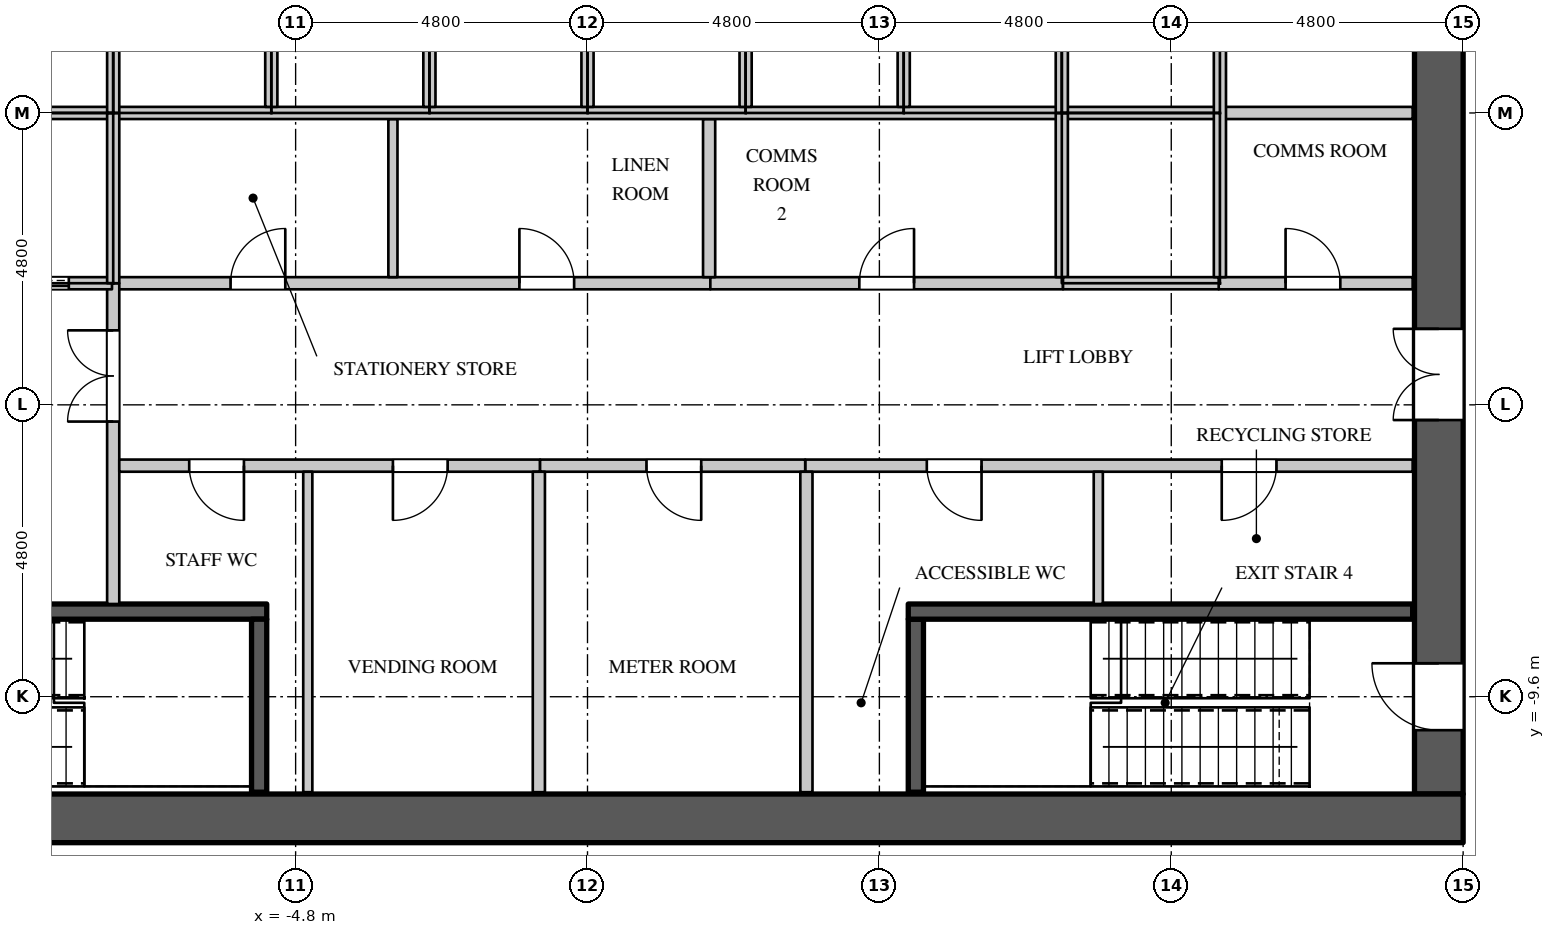
"""IFC4 building model, lengths in metres.
Left out: names, types, materials, properties, quantities, classifications, styles, units other than length and angle.
Written with IfcOpenShell. Run it as: python <this file> out.ifc"""

import sys

from ifc_helpers import new_model, si_unit, direction, frame, frame_2d, origin, place, context, subcontext, project, spatial, rectangle, extrude, element, fill, save


model = new_model("IFC4")
c1 = context("Model", 3, precision=1e-05, world=origin(), true_north=direction((0.0, 1.0)))
c2 = subcontext(c1, "Body", "Model", "MODEL_VIEW")
j1 = project(units=[si_unit("LENGTHUNIT", "METRE"), si_unit("PLANEANGLEUNIT", "RADIAN")], contexts=[c1])
p1 = place(None, origin())
s1 = spatial("IfcSite", under=j1, at=p1, CompositionType="ELEMENT")
p2 = place(p1, origin())
s2 = spatial("IfcBuilding", under=s1, at=p2, CompositionType="ELEMENT")
p3 = place(p2, frame((0.0, 0.0, 131.7)))
s3 = spatial("IfcBuildingStorey", under=s2, at=p3, CompositionType="ELEMENT", Elevation=131.7)
p4 = place(p3, frame((-14.4, -11.6, 0.0), z_axis=(0.0, 0.0, 1.0), x_axis=(1.0, 0.0, 0.0)))
e1 = element("IfcWall", 1, at=p4, inside=s3, PredefinedType="SHEAR", context=c2, shape_type="SweptSolid", body=[
    extrude(rectangle(XDim=28.8, YDim=0.8, at=frame_2d((14.4, 0.0))), origin(), (0.0, 0.0, 1.0), 4.2),
])
p5 = place(p3, frame((14.0, -11.2, 0.0), z_axis=(0.0, 0.0, 1.0), x_axis=(0.0, 1.0, 0.0)))
e2 = element("IfcWall", 2, at=p5, inside=s3, PredefinedType="SHEAR", context=c2, shape_type="SweptSolid", body=[
    extrude(rectangle(XDim=22.4, YDim=0.8, at=frame_2d((11.2, 0.0))), origin(), (0.0, 0.0, 1.0), 4.2),
])
p6 = place(p5, frame((20.25, 0.0, 0.0)))
e3 = element("IfcOpeningElement", 3, at=p6, cuts=e2, PredefinedType="OPENING", context=c2, shape_type="SweptSolid", body=[
    extrude(rectangle(XDim=1.1, YDim=2.2, at=frame_2d((0.55, 1.1))), frame((0.0, 0.41, 0.0), z_axis=(0.0, -1.0, 0.0), x_axis=(1.0, 0.0, 0.0)), (0.0, 0.0, 1.0), 0.82),
])
p7 = place(p5, frame((1.05, 0.0, 0.0)))
e4 = element("IfcOpeningElement", 4, at=p7, cuts=e2, PredefinedType="OPENING", context=c2, shape_type="SweptSolid", body=[
    extrude(rectangle(XDim=1.1, YDim=2.2, at=frame_2d((0.55, 1.1))), frame((0.0, 0.41, 0.0), z_axis=(0.0, -1.0, 0.0), x_axis=(1.0, 0.0, 0.0)), (0.0, 0.0, 1.0), 0.82),
])
p8 = place(p5, frame((14.75, 0.0, 0.0)))
e5 = element("IfcOpeningElement", 5, at=p8, cuts=e2, PredefinedType="OPENING", context=c2, shape_type="SweptSolid", body=[
    extrude(rectangle(XDim=1.5, YDim=2.4, at=frame_2d((0.75, 1.2))), frame((0.0, 0.41, 0.0), z_axis=(0.0, -1.0, 0.0), x_axis=(1.0, 0.0, 0.0)), (0.0, 0.0, 1.0), 0.82),
])
p9 = place(p5, frame((6.15, 0.0, 0.0)))
e6 = element("IfcOpeningElement", 6, at=p9, cuts=e2, PredefinedType="OPENING", context=c2, shape_type="SweptSolid", body=[
    extrude(rectangle(XDim=1.5, YDim=2.4, at=frame_2d((0.75, 1.2))), frame((0.0, 0.41, 0.0), z_axis=(0.0, -1.0, 0.0), x_axis=(1.0, 0.0, 0.0)), (0.0, 0.0, 1.0), 0.82),
])
p10 = place(p3, frame((-7.82, -2.8, 0.0), z_axis=(0.0, 0.0, 1.0), x_axis=(1.0, 0.0, 0.0)))
e7 = element("IfcWall", 7, at=p10, inside=s3, PredefinedType="PARTITIONING", context=c2, shape_type="SweptSolid", body=[
    extrude(rectangle(XDim=9.84, YDim=0.2, at=frame_2d((4.92, 0.0))), origin(), (0.0, 0.0, 1.0), 3.95),
])
p11 = place(p10, frame((1.95, 0.0, 0.0)))
e8 = element("IfcOpeningElement", 8, at=p11, cuts=e7, PredefinedType="OPENING", context=c2, shape_type="SweptSolid", body=[
    extrude(rectangle(XDim=0.9, YDim=2.2, at=frame_2d((0.45, 1.1))), frame((0.0, 0.11, 0.0), z_axis=(0.0, -1.0, 0.0), x_axis=(1.0, 0.0, 0.0)), (0.0, 0.0, 1.0), 0.22),
])
p12 = place(p10, frame((6.7, 0.0, 0.0)))
e9 = element("IfcOpeningElement", 9, at=p12, cuts=e7, PredefinedType="OPENING", context=c2, shape_type="SweptSolid", body=[
    extrude(rectangle(XDim=0.9, YDim=2.2, at=frame_2d((0.45, 1.1))), frame((0.0, 0.11, 0.0), z_axis=(0.0, -1.0, 0.0), x_axis=(1.0, 0.0, 0.0)), (0.0, 0.0, 1.0), 0.22),
])
p13 = place(p3, frame((-7.8, -8.075, 0.0), z_axis=(0.0, 0.0, 1.0), x_axis=(0.0, 1.0, 0.0)))
e10 = element("IfcWall", 10, at=p13, inside=s3, PredefinedType="PARTITIONING", context=c2, shape_type="SweptSolid", body=[
    extrude(rectangle(XDim=5.275, YDim=0.2, at=frame_2d((2.637, 0.0))), origin(), (0.0, 0.0, 1.0), 3.95),
])
p14 = place(p13, frame((3.0, 0.0, 0.0)))
e11 = element("IfcOpeningElement", 11, at=p14, cuts=e10, PredefinedType="OPENING", context=c2, shape_type="SweptSolid", body=[
    extrude(rectangle(XDim=1.5, YDim=2.4, at=frame_2d((0.75, 1.2))), frame((0.0, 0.11, 0.0), z_axis=(0.0, -1.0, 0.0), x_axis=(1.0, 0.0, 0.0)), (0.0, 0.0, 1.0), 0.22),
])
p15 = place(p3, frame((-7.7, -5.8, 0.0), z_axis=(0.0, 0.0, 1.0), x_axis=(1.0, 0.0, 0.0)))
e12 = element("IfcWall", 12, at=p15, inside=s3, PredefinedType="PARTITIONING", context=c2, shape_type="SweptSolid", body=[
    extrude(rectangle(XDim=6.92, YDim=0.2, at=frame_2d((3.46, 0.0))), origin(), (0.0, 0.0, 1.0), 3.95),
])
p16 = place(p15, frame((1.15, 0.0, 0.0)))
e13 = element("IfcOpeningElement", 13, at=p16, cuts=e12, PredefinedType="OPENING", context=c2, shape_type="SweptSolid", body=[
    extrude(rectangle(XDim=0.9, YDim=2.2, at=frame_2d((0.45, 1.1))), frame((0.0, 0.11, 0.0), z_axis=(0.0, -1.0, 0.0), x_axis=(1.0, 0.0, 0.0)), (0.0, 0.0, 1.0), 0.22),
])
p17 = place(p15, frame((4.5, 0.0, 0.0)))
e14 = element("IfcOpeningElement", 14, at=p17, cuts=e12, PredefinedType="OPENING", context=c2, shape_type="SweptSolid", body=[
    extrude(rectangle(XDim=0.9, YDim=2.2, at=frame_2d((0.45, 1.1))), frame((0.0, 0.11, 0.0), z_axis=(0.0, -1.0, 0.0), x_axis=(1.0, 0.0, 0.0)), (0.0, 0.0, 1.0), 0.22),
])
p18 = place(p3, frame((3.58, -5.8, 0.0), z_axis=(0.0, 0.0, 1.0), x_axis=(1.0, 0.0, 0.0)))
e15 = element("IfcWall", 15, at=p18, inside=s3, PredefinedType="PARTITIONING", context=c2, shape_type="SweptSolid", body=[
    extrude(rectangle(XDim=9.99, YDim=0.2, at=frame_2d((4.995, 0.0))), origin(), (0.0, 0.0, 1.0), 3.95),
])
p19 = place(p18, frame((2.0, 0.0, 0.0)))
e16 = element("IfcOpeningElement", 16, at=p19, cuts=e15, PredefinedType="OPENING", context=c2, shape_type="SweptSolid", body=[
    extrude(rectangle(XDim=0.9, YDim=2.2, at=frame_2d((0.45, 1.1))), frame((0.0, 0.11, 0.0), z_axis=(0.0, -1.0, 0.0), x_axis=(1.0, 0.0, 0.0)), (0.0, 0.0, 1.0), 0.22),
])
p20 = place(p18, frame((6.85, 0.0, 0.0)))
e17 = element("IfcOpeningElement", 17, at=p20, cuts=e15, PredefinedType="OPENING", context=c2, shape_type="SweptSolid", body=[
    extrude(rectangle(XDim=0.9, YDim=2.2, at=frame_2d((0.45, 1.1))), frame((0.0, 0.11, 0.0), z_axis=(0.0, -1.0, 0.0), x_axis=(1.0, 0.0, 0.0)), (0.0, 0.0, 1.0), 0.22),
])
p21 = place(p3, frame((-4.6, -11.17, 0.0), z_axis=(0.0, 0.0, 1.0), x_axis=(0.0, 1.0, 0.0)))
e18 = element("IfcWall", 18, at=p21, inside=s3, PredefinedType="PARTITIONING", context=c2, shape_type="SweptSolid", body=[
    extrude(rectangle(XDim=5.27, YDim=0.15, at=frame_2d((2.635, 0.0))), origin(), (0.0, 0.0, 1.0), 3.95),
])
p22 = place(p3, frame((-3.2, -2.7, 0.0), z_axis=(0.0, 0.0, 1.0), x_axis=(0.0, 1.0, 0.0)))
e19 = element("IfcWall", 19, at=p22, inside=s3, PredefinedType="PARTITIONING", context=c2, shape_type="SweptSolid", body=[
    extrude(rectangle(XDim=2.6, YDim=0.15, at=frame_2d((1.3, 0.0))), origin(), (0.0, 0.0, 1.0), 3.95),
])
p23 = place(p3, frame((8.4, -8.075, 0.0), z_axis=(0.0, 0.0, 1.0), x_axis=(0.0, 1.0, 0.0)))
e20 = element("IfcWall", 20, at=p23, inside=s3, PredefinedType="PARTITIONING", context=c2, shape_type="SweptSolid", body=[
    extrude(rectangle(XDim=2.175, YDim=0.15, at=frame_2d((1.087, 0.0))), origin(), (0.0, 0.0, 1.0), 3.95),
])
p24 = place(p3, frame((-0.78, -5.8, 0.0), z_axis=(0.0, 0.0, 1.0), x_axis=(1.0, 0.0, 0.0)))
e21 = element("IfcWall", 21, at=p24, inside=s3, PredefinedType="PARTITIONING", context=c2, shape_type="SweptSolid", body=[
    extrude(rectangle(XDim=4.36, YDim=0.2, at=frame_2d((2.18, 0.0))), origin(), (0.0, 0.0, 1.0), 3.95),
])
p25 = place(p24, frame((1.75, 0.0, 0.0)))
e22 = element("IfcOpeningElement", 22, at=p25, cuts=e21, PredefinedType="OPENING", context=c2, shape_type="SweptSolid", body=[
    extrude(rectangle(XDim=0.9, YDim=2.2, at=frame_2d((0.45, 1.1))), frame((0.0, 0.11, 0.0), z_axis=(0.0, -1.0, 0.0), x_axis=(1.0, 0.0, 0.0)), (0.0, 0.0, 1.0), 0.22),
])
p26 = place(p3, frame((-0.8, -11.17, 0.0), z_axis=(0.0, 0.0, 1.0), x_axis=(0.0, 1.0, 0.0)))
e23 = element("IfcWall", 23, at=p26, inside=s3, PredefinedType="PARTITIONING", context=c2, shape_type="SweptSolid", body=[
    extrude(rectangle(XDim=5.27, YDim=0.2, at=frame_2d((2.635, 0.0))), origin(), (0.0, 0.0, 1.0), 3.95),
])
p27 = place(p3, frame((2.02, -2.8, 0.0), z_axis=(0.0, 0.0, 1.0), x_axis=(1.0, 0.0, 0.0)))
e24 = element("IfcWall", 24, at=p27, inside=s3, PredefinedType="PARTITIONING", context=c2, shape_type="SweptSolid", body=[
    extrude(rectangle(XDim=5.8, YDim=0.2, at=frame_2d((2.9, 0.0))), origin(), (0.0, 0.0, 1.0), 3.95),
])
p28 = place(p27, frame((2.45, 0.0, 0.0)))
e25 = element("IfcOpeningElement", 25, at=p28, cuts=e24, PredefinedType="OPENING", context=c2, shape_type="SweptSolid", body=[
    extrude(rectangle(XDim=0.9, YDim=2.2, at=frame_2d((0.45, 1.1))), frame((0.0, 0.11, 0.0), z_axis=(0.0, -1.0, 0.0), x_axis=(1.0, 0.0, 0.0)), (0.0, 0.0, 1.0), 0.22),
])
p29 = place(p3, frame((2.0, -2.7, 0.0), z_axis=(0.0, 0.0, 1.0), x_axis=(0.0, 1.0, 0.0)))
e26 = element("IfcWall", 26, at=p29, inside=s3, PredefinedType="PARTITIONING", context=c2, shape_type="SweptSolid", body=[
    extrude(rectangle(XDim=2.6, YDim=0.2, at=frame_2d((1.3, 0.0))), origin(), (0.0, 0.0, 1.0), 3.95),
])
p30 = place(p3, frame((3.6, -11.17, 0.0), z_axis=(0.0, 0.0, 1.0), x_axis=(0.0, 1.0, 0.0)))
e27 = element("IfcWall", 27, at=p30, inside=s3, PredefinedType="PARTITIONING", context=c2, shape_type="SweptSolid", body=[
    extrude(rectangle(XDim=5.27, YDim=0.2, at=frame_2d((2.635, 0.0))), origin(), (0.0, 0.0, 1.0), 3.95),
])
p31 = place(p3, frame((10.38, -2.8, 0.0), z_axis=(0.0, 0.0, 1.0), x_axis=(1.0, 0.0, 0.0)))
e28 = element("IfcWall", 28, at=p31, inside=s3, PredefinedType="PARTITIONING", context=c2, shape_type="SweptSolid", body=[
    extrude(rectangle(XDim=3.19, YDim=0.2, at=frame_2d((1.595, 0.0))), origin(), (0.0, 0.0, 1.0), 3.95),
])
p32 = place(p31, frame((1.1, 0.0, 0.0)))
e29 = element("IfcOpeningElement", 29, at=p32, cuts=e28, PredefinedType="OPENING", context=c2, shape_type="SweptSolid", body=[
    extrude(rectangle(XDim=0.9, YDim=2.2, at=frame_2d((0.45, 1.1))), frame((0.0, 0.11, 0.0), z_axis=(0.0, -1.0, 0.0), x_axis=(1.0, 0.0, 0.0)), (0.0, 0.0, 1.0), 0.22),
])
p33 = place(p3, frame((10.4, 0.0, 0.0), z_axis=(0.0, 0.0, 1.0), x_axis=(1.0, 0.0, 0.0)))
e30 = element("IfcWall", 30, at=p33, inside=s3, PredefinedType="PARTITIONING", context=c2, shape_type="SweptSolid", body=[
    extrude(rectangle(XDim=3.17, YDim=0.2, at=frame_2d((1.585, 0.0))), origin(), (0.0, 0.0, 1.0), 3.95),
])
p34 = place(p3, frame((-13.57, 0.0, 0.0), z_axis=(0.0, 0.0, 1.0), x_axis=(1.0, 0.0, 0.0)))
e31 = element("IfcWall", 31, at=p34, inside=s3, PredefinedType="PARTITIONING", context=c2, shape_type="SweptSolid", body=[
    extrude(rectangle(XDim=23.97, YDim=0.2, at=frame_2d((11.985, 0.0))), origin(), (0.0, 0.0, 1.0), 3.95),
])
p35 = place(p3, frame((-10.38, -2.8, 0.0), z_axis=(0.0, 0.0, 1.0), x_axis=(1.0, 0.0, 0.0)))
e32 = element("IfcWall", 32, at=p35, inside=s3, PredefinedType="PARTITIONING", context=c2, shape_type="SweptSolid", body=[
    extrude(rectangle(XDim=2.56, YDim=0.2, at=frame_2d((1.28, 0.0))), origin(), (0.0, 0.0, 1.0), 3.95),
])
p36 = place(p35, frame((0.75, 0.0, 0.0)))
e33 = element("IfcOpeningElement", 33, at=p36, cuts=e32, PredefinedType="OPENING", context=c2, shape_type="SweptSolid", body=[
    extrude(rectangle(XDim=1.1, YDim=2.2, at=frame_2d((0.55, 1.1))), frame((0.0, 0.11, 0.0), z_axis=(0.0, -1.0, 0.0), x_axis=(1.0, 0.0, 0.0)), (0.0, 0.0, 1.0), 0.22),
])
for number, where, z_axis, x_axis in (
    (34, (-7.8, -2.8, 0.0), (0.0, 0.0, 1.0), (0.0, 1.0, 0.0)),
    (35, (-7.8, 0.0, 0.0), (0.0, 0.0, 1.0), (0.0, 1.0, 0.0)),
):
    element("IfcWall", number, at=place(p3, frame(where, z_axis=z_axis, x_axis=x_axis)), inside=s3, PredefinedType="PARTITIONING", context=c2, shape_type="SweptSolid", body=[
        extrude(rectangle(XDim=2.8, YDim=0.2, at=frame_2d((1.4, 0.0))), origin(), (0.0, 0.0, 1.0), 3.95),
    ])
for number, where, z_axis, x_axis in (
    (36, (-5.2, 0.1, 0.0), (0.0, 0.0, 1.0), (0.0, 1.0, 0.0)),
    (37, (-2.6, 0.1, 0.0), (0.0, 0.0, 1.0), (0.0, 1.0, 0.0)),
    (38, (0.0, 0.1, 0.0), (0.0, 0.0, 1.0), (0.0, 1.0, 0.0)),
    (39, (2.6, 0.1, 0.0), (0.0, 0.0, 1.0), (0.0, 1.0, 0.0)),
    (40, (5.2, 0.1, 0.0), (0.0, 0.0, 1.0), (0.0, 1.0, 0.0)),
):
    element("IfcWall", number, at=place(p3, frame(where, z_axis=z_axis, x_axis=x_axis)), inside=s3, PredefinedType="PARTITIONING", context=c2, shape_type="SweptSolid", body=[
        extrude(rectangle(XDim=2.6, YDim=0.2, at=frame_2d((1.3, 0.0))), origin(), (0.0, 0.0, 1.0), 3.95),
    ])
p37 = place(p3, frame((7.8, -2.7, 0.0), z_axis=(0.0, 0.0, 1.0), x_axis=(0.0, 1.0, 0.0)))
e41 = element("IfcWall", 41, at=p37, inside=s3, PredefinedType="PARTITIONING", context=c2, shape_type="SweptSolid", body=[
    extrude(rectangle(XDim=2.7, YDim=0.2, at=frame_2d((1.35, 0.0))), origin(), (0.0, 0.0, 1.0), 3.95),
])
p38 = place(p3, frame((7.82, -2.8, 0.0), z_axis=(0.0, 0.0, 1.0), x_axis=(1.0, 0.0, 0.0)))
e42 = element("IfcWall", 42, at=p38, inside=s3, PredefinedType="PARTITIONING", context=c2, shape_type="SweptSolid", body=[
    extrude(rectangle(XDim=2.56, YDim=0.2, at=frame_2d((1.28, 0.0))), origin(), (0.0, 0.0, 1.0), 3.95),
])
p39 = place(p3, frame((7.8, 0.0, 0.0), z_axis=(0.0, 0.0, 1.0), x_axis=(0.0, 1.0, 0.0)))
e43 = element("IfcWall", 43, at=p39, inside=s3, PredefinedType="PARTITIONING", context=c2, shape_type="SweptSolid", body=[
    extrude(rectangle(XDim=2.7, YDim=0.2, at=frame_2d((1.35, 0.0))), origin(), (0.0, 0.0, 1.0), 3.95),
])
p40 = place(p3, frame((10.4, -2.7, 0.0), z_axis=(0.0, 0.0, 1.0), x_axis=(0.0, 1.0, 0.0)))
e44 = element("IfcWall", 44, at=p40, inside=s3, PredefinedType="PARTITIONING", context=c2, shape_type="SweptSolid", body=[
    extrude(rectangle(XDim=5.4, YDim=0.2, at=frame_2d((2.7, 0.0))), origin(), (0.0, 0.0, 1.0), 3.95),
])
p41 = place(p3, frame((-13.57, -8.2, 0.0), z_axis=(0.0, 0.0, 1.0), x_axis=(1.0, 0.0, 0.0)))
e45 = element("IfcWall", 45, at=p41, inside=s3, PredefinedType="SHEAR", context=c2, shape_type="SweptSolid", body=[
    extrude(rectangle(XDim=8.295, YDim=0.25, at=frame_2d((4.147, 0.0))), origin(), (0.0, 0.0, 1.0), 3.95),
])
p42 = place(p41, frame((0.15, 0.0, 0.0)))
e46 = element("IfcOpeningElement", 46, at=p42, cuts=e45, PredefinedType="OPENING", context=c2, shape_type="SweptSolid", body=[
    extrude(rectangle(XDim=1.1, YDim=2.2, at=frame_2d((0.55, 1.1))), frame((0.0, 0.135, 0.0), z_axis=(0.0, -1.0, 0.0), x_axis=(1.0, 0.0, 0.0)), (0.0, 0.0, 1.0), 0.27),
])
for number, where, z_axis, x_axis in (
    (47, (-5.4, -11.17, 0.0), (0.0, 0.0, 1.0), (0.0, 1.0, 0.0)),
    (48, (5.4, -11.17, 0.0), (0.0, 0.0, 1.0), (0.0, 1.0, 0.0)),
):
    element("IfcWall", number, at=place(p3, frame(where, z_axis=z_axis, x_axis=x_axis)), inside=s3, PredefinedType="SHEAR", context=c2, shape_type="SweptSolid", body=[
        extrude(rectangle(XDim=2.845, YDim=0.25, at=frame_2d((1.422, 0.0))), origin(), (0.0, 0.0, 1.0), 3.95),
    ])
p43 = place(p3, frame((5.275, -8.2, 0.0), z_axis=(0.0, 0.0, 1.0), x_axis=(1.0, 0.0, 0.0)))
e49 = element("IfcWall", 49, at=p43, inside=s3, PredefinedType="SHEAR", context=c2, shape_type="SweptSolid", body=[
    extrude(rectangle(XDim=8.295, YDim=0.25, at=frame_2d((4.147, 0.0))), origin(), (0.0, 0.0, 1.0), 3.95),
])
p44 = place(p32, origin())
e50 = element("IfcDoor", 50, at=p44, inside=s3, OperationType="SINGLE_SWING_LEFT", PredefinedType="DOOR", context=c2, shape_type="SweptSolid", body=[
    extrude(rectangle(XDim=0.9, YDim=2.2, at=frame_2d((0.45, 1.1))), frame((0.0, 0.025, 0.0), z_axis=(0.0, -1.0, 0.0), x_axis=(1.0, 0.0, 0.0)), (0.0, 0.0, 1.0), 0.05),
])
fill(e29, e50)
p45 = place(p16, origin())
e51 = element("IfcDoor", 51, at=p45, inside=s3, OperationType="SINGLE_SWING_LEFT", PredefinedType="DOOR", context=c2, shape_type="SweptSolid", body=[
    extrude(rectangle(XDim=0.9, YDim=2.2, at=frame_2d((0.45, 1.1))), frame((0.0, 0.025, 0.0), z_axis=(0.0, -1.0, 0.0), x_axis=(1.0, 0.0, 0.0)), (0.0, 0.0, 1.0), 0.05),
])
fill(e13, e51)
p46 = place(p17, origin())
e52 = element("IfcDoor", 52, at=p46, inside=s3, OperationType="SINGLE_SWING_RIGHT", PredefinedType="DOOR", context=c2, shape_type="SweptSolid", body=[
    extrude(rectangle(XDim=0.9, YDim=2.2, at=frame_2d((0.45, 1.1))), frame((0.0, 0.025, 0.0), z_axis=(0.0, -1.0, 0.0), x_axis=(1.0, 0.0, 0.0)), (0.0, 0.0, 1.0), 0.05),
])
fill(e14, e52)
p47 = place(p25, origin())
e53 = element("IfcDoor", 53, at=p47, inside=s3, OperationType="SINGLE_SWING_LEFT", PredefinedType="DOOR", context=c2, shape_type="SweptSolid", body=[
    extrude(rectangle(XDim=0.9, YDim=2.2, at=frame_2d((0.45, 1.1))), frame((0.0, 0.025, 0.0), z_axis=(0.0, -1.0, 0.0), x_axis=(1.0, 0.0, 0.0)), (0.0, 0.0, 1.0), 0.05),
])
fill(e22, e53)
p48 = place(p19, origin())
e54 = element("IfcDoor", 54, at=p48, inside=s3, OperationType="SINGLE_SWING_LEFT", PredefinedType="DOOR", context=c2, shape_type="SweptSolid", body=[
    extrude(rectangle(XDim=0.9, YDim=2.2, at=frame_2d((0.45, 1.1))), frame((0.0, 0.025, 0.0), z_axis=(0.0, -1.0, 0.0), x_axis=(1.0, 0.0, 0.0)), (0.0, 0.0, 1.0), 0.05),
])
fill(e16, e54)
p49 = place(p20, origin())
e55 = element("IfcDoor", 55, at=p49, inside=s3, OperationType="SINGLE_SWING_RIGHT", PredefinedType="DOOR", context=c2, shape_type="SweptSolid", body=[
    extrude(rectangle(XDim=0.9, YDim=2.2, at=frame_2d((0.45, 1.1))), frame((0.0, 0.025, 0.0), z_axis=(0.0, -1.0, 0.0), x_axis=(1.0, 0.0, 0.0)), (0.0, 0.0, 1.0), 0.05),
])
fill(e17, e55)
p50 = place(p11, origin())
e56 = element("IfcDoor", 56, at=p50, inside=s3, OperationType="SINGLE_SWING_RIGHT", PredefinedType="DOOR", context=c2, shape_type="SweptSolid", body=[
    extrude(rectangle(XDim=0.9, YDim=2.2, at=frame_2d((0.45, 1.1))), frame((0.0, 0.025, 0.0), z_axis=(0.0, -1.0, 0.0), x_axis=(1.0, 0.0, 0.0)), (0.0, 0.0, 1.0), 0.05),
])
fill(e8, e56)
p51 = place(p12, origin())
e57 = element("IfcDoor", 57, at=p51, inside=s3, OperationType="SINGLE_SWING_LEFT", PredefinedType="DOOR", context=c2, shape_type="SweptSolid", body=[
    extrude(rectangle(XDim=0.9, YDim=2.2, at=frame_2d((0.45, 1.1))), frame((0.0, 0.025, 0.0), z_axis=(0.0, -1.0, 0.0), x_axis=(1.0, 0.0, 0.0)), (0.0, 0.0, 1.0), 0.05),
])
fill(e9, e57)
p52 = place(p28, origin())
e58 = element("IfcDoor", 58, at=p52, inside=s3, OperationType="SINGLE_SWING_RIGHT", PredefinedType="DOOR", context=c2, shape_type="SweptSolid", body=[
    extrude(rectangle(XDim=0.9, YDim=2.2, at=frame_2d((0.45, 1.1))), frame((0.0, 0.025, 0.0), z_axis=(0.0, -1.0, 0.0), x_axis=(1.0, 0.0, 0.0)), (0.0, 0.0, 1.0), 0.05),
])
fill(e25, e58)
p53 = place(p36, origin())
e59 = element("IfcDoor", 59, at=p53, inside=s3, OperationType="DOUBLE_DOOR_SLIDING", PredefinedType="DOOR", context=c2, shape_type="SweptSolid", body=[
    extrude(rectangle(XDim=1.1, YDim=2.2, at=frame_2d((0.55, 1.1))), frame((0.0, 0.025, 0.0), z_axis=(0.0, -1.0, 0.0), x_axis=(1.0, 0.0, 0.0)), (0.0, 0.0, 1.0), 0.05),
])
fill(e33, e59)
p54 = place(p14, origin())
e60 = element("IfcDoor", 60, at=p54, inside=s3, OperationType="DOUBLE_DOOR_SINGLE_SWING", PredefinedType="DOOR", context=c2, shape_type="SweptSolid", body=[
    extrude(rectangle(XDim=1.5, YDim=2.4, at=frame_2d((0.75, 1.2))), frame((0.0, 0.025, 0.0), z_axis=(0.0, -1.0, 0.0), x_axis=(1.0, 0.0, 0.0)), (0.0, 0.0, 1.0), 0.05),
])
fill(e11, e60)
p55 = place(p7, origin())
e61 = element("IfcDoor", 61, at=p55, inside=s3, OperationType="SINGLE_SWING_RIGHT", PredefinedType="DOOR", context=c2, shape_type="SweptSolid", body=[
    extrude(rectangle(XDim=1.1, YDim=2.2, at=frame_2d((0.55, 1.1))), frame((0.0, 0.395, 0.0), z_axis=(0.0, -1.0, 0.0), x_axis=(1.0, 0.0, 0.0)), (0.0, 0.0, 1.0), 0.05),
])
fill(e4, e61)
p56 = place(p9, origin())
e62 = element("IfcDoor", 62, at=p56, inside=s3, OperationType="DOUBLE_DOOR_SINGLE_SWING", PredefinedType="DOOR", context=c2, shape_type="SweptSolid", body=[
    extrude(rectangle(XDim=1.5, YDim=2.4, at=frame_2d((0.75, 1.2))), frame((0.0, 0.395, 0.0), z_axis=(0.0, -1.0, 0.0), x_axis=(1.0, 0.0, 0.0)), (0.0, 0.0, 1.0), 0.05),
])
fill(e6, e62)
save(model, sys.argv[1])
